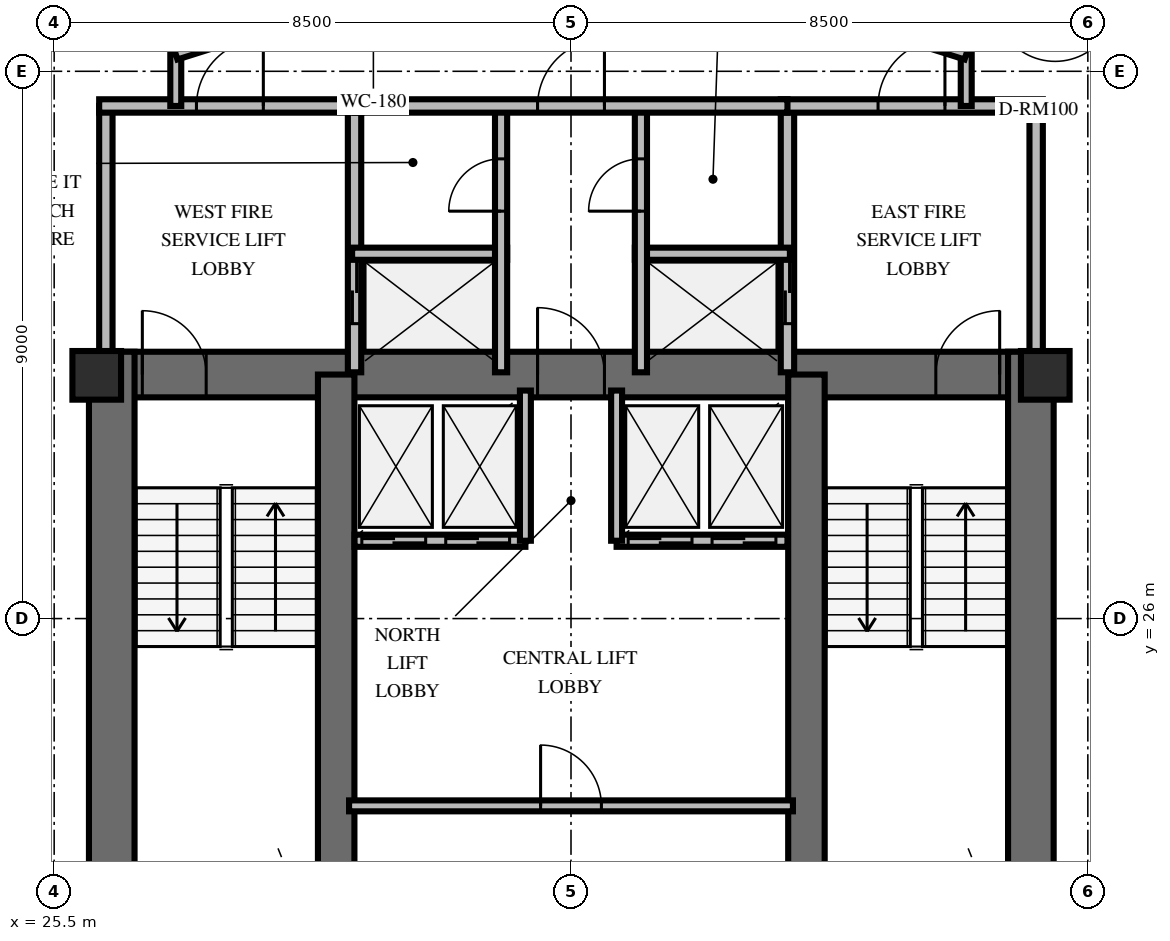
"""IFC4 building model, lengths in metres.
Left out: names, types, materials, properties, quantities, classifications, styles, units other than length and angle.
Written with IfcOpenShell. Run it as: python <this file> out.ifc"""

import sys

from ifc_helpers import new_model, si_unit, direction, frame, frame_2d, origin, origin_2d, place, context, subcontext, project, spatial, rectangle, extrude, element, fill, save


model = new_model("IFC4")
c1 = context("Model", 3, precision=1e-05, world=origin(), true_north=direction((0.0, 1.0)))
c2 = subcontext(c1, "Body", "Model", "MODEL_VIEW")
j1 = project(units=[si_unit("LENGTHUNIT", "METRE"), si_unit("PLANEANGLEUNIT", "RADIAN")], contexts=[c1])
p1 = place(None, origin())
s1 = spatial("IfcSite", under=j1, at=p1, CompositionType="ELEMENT")
p2 = place(p1, origin())
s2 = spatial("IfcBuilding", under=s1, at=p2, CompositionType="ELEMENT")
p3 = place(p2, frame((0.0, 0.0, 206.0)))
s3 = spatial("IfcBuildingStorey", under=s2, at=p3, CompositionType="ELEMENT", Elevation=206.0)
p4 = place(p3, frame((26.072, 30.013, 0.0), z_axis=(0.0, 0.0, 1.0), x_axis=(1.0, 0.0, 0.0)))
e1 = element("IfcWall", 1, at=p4, inside=s3, PredefinedType="SHEAR", context=c2, shape_type="SweptSolid", body=[
    extrude(rectangle(XDim=15.866, YDim=0.75, at=frame_2d((7.933, 0.0))), origin(), (0.0, 0.0, 1.0), 3.6),
])
p5 = place(p4, frame((0.878, 0.0, 0.0)))
e2 = element("IfcOpeningElement", 2, at=p5, cuts=e1, PredefinedType="OPENING", context=c2, shape_type="SweptSolid", body=[
    extrude(rectangle(XDim=1.05, YDim=2.15, at=frame_2d((0.525, 1.075))), frame((0.0, 0.385, 0.0), z_axis=(0.0, -1.0, 0.0), x_axis=(1.0, 0.0, 0.0)), (0.0, 0.0, 1.0), 0.77),
])
p6 = place(p4, frame((13.928, 0.0, 0.0)))
e3 = element("IfcOpeningElement", 3, at=p6, cuts=e1, PredefinedType="OPENING", context=c2, shape_type="SweptSolid", body=[
    extrude(rectangle(XDim=1.05, YDim=2.15, at=frame_2d((0.525, 1.075))), frame((0.0, 0.385, 0.0), z_axis=(0.0, -1.0, 0.0), x_axis=(1.0, 0.0, 0.0)), (0.0, 0.0, 1.0), 0.77),
])
p7 = place(p4, frame((7.378, 0.0, 0.0)))
e4 = element("IfcOpeningElement", 4, at=p7, cuts=e1, PredefinedType="OPENING", context=c2, shape_type="SweptSolid", body=[
    extrude(rectangle(XDim=1.1, YDim=2.15, at=frame_2d((0.55, 1.075))), frame((0.0, 0.385, 0.0), z_axis=(0.0, -1.0, 0.0), x_axis=(1.0, 0.0, 0.0)), (0.0, 0.0, 1.0), 0.77),
])
for number, where, z_axis, x_axis in (
    (5, (26.447, 19.812, 0.0), (0.0, 0.0, 1.0), (0.0, 1.0, 0.0)),
    (6, (41.563, 19.812, 0.0), (0.0, 0.0, 1.0), (0.0, 1.0, 0.0)),
):
    element("IfcWall", number, at=place(p3, frame(where, z_axis=z_axis, x_axis=x_axis)), inside=s3, PredefinedType="SHEAR", context=c2, shape_type="SweptSolid", body=[
        extrude(rectangle(XDim=10.576, YDim=0.75, at=frame_2d((5.288, 0.0))), origin(), (0.0, 0.0, 1.0), 3.6),
    ])
for number, where, z_axis, x_axis in (
    (7, (30.138, 20.187, 0.0), (0.0, 0.0, 1.0), (0.0, 1.0, 0.0)),
    (8, (37.872, 20.187, 0.0), (0.0, 0.0, 1.0), (0.0, 1.0, 0.0)),
):
    element("IfcWall", number, at=place(p3, frame(where, z_axis=z_axis, x_axis=x_axis)), inside=s3, PredefinedType="SHEAR", context=c2, shape_type="SweptSolid", body=[
        extrude(rectangle(XDim=9.826, YDim=0.6, at=frame_2d((4.913, 0.0))), origin(), (0.0, 0.0, 1.0), 3.6),
    ])
for number, where, z_axis, x_axis in (
    (9, (26.2, 30.0, 0.0), (0.0, 0.0, 1.0), (1.0, 0.0, 0.0)),
    (10, (41.8, 30.0, 0.0), (0.0, 0.0, 1.0), (1.0, 0.0, 0.0)),
):
    element("IfcColumn", number, at=place(p3, frame(where, z_axis=z_axis, x_axis=x_axis)), inside=s3, PredefinedType="PILASTER", context=c2, shape_type="SweptSolid", body=[
        extrude(rectangle(XDim=0.8, YDim=0.8, at=origin_2d()), origin(), (0.0, 0.0, 1.0), 3.6),
    ])
p8 = place(p3, frame((26.35, 30.05, 0.0), z_axis=(0.0, 0.0, 1.0), x_axis=(0.0, 1.0, 0.0)))
e11 = element("IfcWall", 11, at=p8, inside=s3, PredefinedType="SOLIDWALL", context=c2, shape_type="SweptSolid", body=[
    extrude(rectangle(XDim=4.38, YDim=0.22, at=frame_2d((2.19, 0.0))), origin(), (0.0, 0.0, 1.0), 2.46),
])
p9 = place(p3, frame((30.44, 30.05, 0.0), z_axis=(0.0, 0.0, 1.0), x_axis=(0.0, 1.0, 0.0)))
e12 = element("IfcWall", 12, at=p9, inside=s3, PredefinedType="SOLIDWALL", context=c2, shape_type="SweptSolid", body=[
    extrude(rectangle(XDim=4.38, YDim=0.22, at=frame_2d((2.19, 0.0))), origin(), (0.0, 0.0, 1.0), 2.46),
])
p10 = place(p9, frame((0.8, 0.0, 0.0)))
e13 = element("IfcOpeningElement", 13, at=p10, cuts=e12, PredefinedType="OPENING", context=c2, shape_type="SweptSolid", body=[
    extrude(rectangle(XDim=1.05, YDim=2.1, at=frame_2d((0.525, 1.05))), frame((0.0, 0.12, 0.0), z_axis=(0.0, -1.0, 0.0), x_axis=(1.0, 0.0, 0.0)), (0.0, 0.0, 1.0), 0.24),
])
p11 = place(p3, frame((26.24, 34.43, 0.0), z_axis=(0.0, 0.0, 1.0), x_axis=(1.0, 0.0, 0.0)))
e14 = element("IfcWall", 14, at=p11, inside=s3, PredefinedType="SOLIDWALL", context=c2, shape_type="SweptSolid", body=[
    extrude(rectangle(XDim=4.31, YDim=0.22, at=frame_2d((2.155, 0.0))), origin(), (0.0, 0.0, 1.0), 2.46),
])
p12 = place(p11, frame((1.6, 0.0, 0.0)))
e15 = element("IfcOpeningElement", 15, at=p12, cuts=e14, PredefinedType="OPENING", context=c2, shape_type="SweptSolid", body=[
    extrude(rectangle(XDim=1.1, YDim=2.15, at=frame_2d((0.55, 1.075))), frame((0.0, 0.12, 0.0), z_axis=(0.0, -1.0, 0.0), x_axis=(1.0, 0.0, 0.0)), (0.0, 0.0, 1.0), 0.24),
])
p13 = place(p3, frame((30.4, 32.0, 0.0), z_axis=(0.0, 0.0, 1.0), x_axis=(1.0, 0.0, 0.0)))
e16 = element("IfcWall", 16, at=p13, inside=s3, PredefinedType="SOLIDWALL", context=c2, shape_type="SweptSolid", body=[
    extrude(rectangle(XDim=2.55, YDim=0.2, at=frame_2d((1.275, 0.0))), origin(), (0.0, 0.0, 1.0), 2.46),
])
p14 = place(p3, frame((32.85, 30.05, 0.0), z_axis=(0.0, 0.0, 1.0), x_axis=(0.0, 1.0, 0.0)))
e17 = element("IfcWall", 17, at=p14, inside=s3, PredefinedType="SOLIDWALL", context=c2, shape_type="SweptSolid", body=[
    extrude(rectangle(XDim=4.38, YDim=0.2, at=frame_2d((2.19, 0.0))), origin(), (0.0, 0.0, 1.0), 2.46),
])
p15 = place(p14, frame((2.65, 0.0, 0.0)))
e18 = element("IfcOpeningElement", 18, at=p15, cuts=e17, PredefinedType="OPENING", context=c2, shape_type="SweptSolid", body=[
    extrude(rectangle(XDim=0.86, YDim=2.05, at=frame_2d((0.43, 1.025))), frame((0.0, 0.11, 0.0), z_axis=(0.0, -1.0, 0.0), x_axis=(1.0, 0.0, 0.0)), (0.0, 0.0, 1.0), 0.22),
])
p16 = place(p3, frame((37.56, 30.05, 0.0), z_axis=(0.0, 0.0, 1.0), x_axis=(0.0, 1.0, 0.0)))
e19 = element("IfcWall", 19, at=p16, inside=s3, PredefinedType="SOLIDWALL", context=c2, shape_type="SweptSolid", body=[
    extrude(rectangle(XDim=4.38, YDim=0.22, at=frame_2d((2.19, 0.0))), origin(), (0.0, 0.0, 1.0), 2.46),
])
p17 = place(p16, frame((0.8, 0.0, 0.0)))
e20 = element("IfcOpeningElement", 20, at=p17, cuts=e19, PredefinedType="OPENING", context=c2, shape_type="SweptSolid", body=[
    extrude(rectangle(XDim=1.05, YDim=2.1, at=frame_2d((0.525, 1.05))), frame((0.0, 0.12, 0.0), z_axis=(0.0, -1.0, 0.0), x_axis=(1.0, 0.0, 0.0)), (0.0, 0.0, 1.0), 0.24),
])
p18 = place(p3, frame((41.65, 30.05, 0.0), z_axis=(0.0, 0.0, 1.0), x_axis=(0.0, 1.0, 0.0)))
e21 = element("IfcWall", 21, at=p18, inside=s3, PredefinedType="SOLIDWALL", context=c2, shape_type="SweptSolid", body=[
    extrude(rectangle(XDim=4.38, YDim=0.22, at=frame_2d((2.19, 0.0))), origin(), (0.0, 0.0, 1.0), 2.46),
])
p19 = place(p3, frame((37.45, 34.43, 0.0), z_axis=(0.0, 0.0, 1.0), x_axis=(1.0, 0.0, 0.0)))
e22 = element("IfcWall", 22, at=p19, inside=s3, PredefinedType="SOLIDWALL", context=c2, shape_type="SweptSolid", body=[
    extrude(rectangle(XDim=4.31, YDim=0.22, at=frame_2d((2.155, 0.0))), origin(), (0.0, 0.0, 1.0), 2.46),
])
p20 = place(p19, frame((1.6, 0.0, 0.0)))
e23 = element("IfcOpeningElement", 23, at=p20, cuts=e22, PredefinedType="OPENING", context=c2, shape_type="SweptSolid", body=[
    extrude(rectangle(XDim=1.1, YDim=2.15, at=frame_2d((0.55, 1.075))), frame((0.0, 0.12, 0.0), z_axis=(0.0, -1.0, 0.0), x_axis=(1.0, 0.0, 0.0)), (0.0, 0.0, 1.0), 0.24),
])
p21 = place(p3, frame((35.05, 32.0, 0.0), z_axis=(0.0, 0.0, 1.0), x_axis=(1.0, 0.0, 0.0)))
e24 = element("IfcWall", 24, at=p21, inside=s3, PredefinedType="SOLIDWALL", context=c2, shape_type="SweptSolid", body=[
    extrude(rectangle(XDim=2.55, YDim=0.2, at=frame_2d((1.275, 0.0))), origin(), (0.0, 0.0, 1.0), 2.46),
])
p22 = place(p3, frame((35.15, 30.05, 0.0), z_axis=(0.0, 0.0, 1.0), x_axis=(0.0, 1.0, 0.0)))
e25 = element("IfcWall", 25, at=p22, inside=s3, PredefinedType="SOLIDWALL", context=c2, shape_type="SweptSolid", body=[
    extrude(rectangle(XDim=4.38, YDim=0.2, at=frame_2d((2.19, 0.0))), origin(), (0.0, 0.0, 1.0), 2.46),
])
p23 = place(p22, frame((2.65, 0.0, 0.0)))
e26 = element("IfcOpeningElement", 26, at=p23, cuts=e25, PredefinedType="OPENING", context=c2, shape_type="SweptSolid", body=[
    extrude(rectangle(XDim=0.86, YDim=2.05, at=frame_2d((0.43, 1.025))), frame((0.0, 0.11, 0.0), z_axis=(0.0, -1.0, 0.0), x_axis=(1.0, 0.0, 0.0)), (0.0, 0.0, 1.0), 0.22),
])
p24 = place(p3, frame((30.44, 34.43, 0.0), z_axis=(0.0, 0.0, 1.0), x_axis=(1.0, 0.0, 0.0)))
e27 = element("IfcWall", 27, at=p24, inside=s3, PredefinedType="SOLIDWALL", context=c2, shape_type="SweptSolid", body=[
    extrude(rectangle(XDim=7.12, YDim=0.22, at=frame_2d((3.56, 0.0))), origin(), (0.0, 0.0, 1.0), 2.46),
])
p25 = place(p24, frame((3.01, 0.0, 0.0)))
e28 = element("IfcOpeningElement", 28, at=p25, cuts=e27, PredefinedType="OPENING", context=c2, shape_type="SweptSolid", body=[
    extrude(rectangle(XDim=1.1, YDim=2.15, at=frame_2d((0.55, 1.075))), frame((0.0, 0.12, 0.0), z_axis=(0.0, -1.0, 0.0), x_axis=(1.0, 0.0, 0.0)), (0.0, 0.0, 1.0), 0.24),
])
p26 = place(p3, frame((30.35, 22.92, 0.0), z_axis=(0.0, 0.0, 1.0), x_axis=(1.0, 0.0, 0.0)))
e29 = element("IfcWall", 29, at=p26, inside=s3, PredefinedType="PARTITIONING", context=c2, shape_type="SweptSolid", body=[
    extrude(rectangle(XDim=7.3, YDim=0.18, at=frame_2d((3.65, 0.0))), origin(), (0.0, 0.0, 1.0), 2.46),
])
p27 = place(p26, frame((3.15, 0.0, 0.0)))
e30 = element("IfcOpeningElement", 30, at=p27, cuts=e29, PredefinedType="OPENING", context=c2, shape_type="SweptSolid", body=[
    extrude(rectangle(XDim=1.0, YDim=2.15, at=frame_2d((0.5, 1.075))), frame((0.0, 0.1, 0.0), z_axis=(0.0, -1.0, 0.0), x_axis=(1.0, 0.0, 0.0)), (0.0, 0.0, 1.0), 0.2),
])
p28 = place(p3, frame((30.44, 27.28, 0.0), z_axis=(0.0, 0.0, 1.0), x_axis=(1.0, 0.0, 0.0)))
e31 = element("IfcWall", 31, at=p28, inside=s3, PredefinedType="SOLIDWALL", context=c2, shape_type="SweptSolid", body=[
    extrude(rectangle(XDim=2.81, YDim=0.2, at=frame_2d((1.405, 0.0))), origin(), (0.0, 0.0, 1.0), 2.46),
])
p29 = place(p28, frame((0.12, 0.0, 0.0)))
e32 = element("IfcOpeningElement", 32, at=p29, cuts=e31, PredefinedType="OPENING", context=c2, shape_type="SweptSolid", body=[
    extrude(rectangle(XDim=1.05, YDim=2.1, at=frame_2d((0.525, 1.05))), frame((0.0, 0.11, 0.0), z_axis=(0.0, -1.0, 0.0), x_axis=(1.0, 0.0, 0.0)), (0.0, 0.0, 1.0), 0.22),
])
p30 = place(p28, frame((1.5, 0.0, 0.0)))
e33 = element("IfcOpeningElement", 33, at=p30, cuts=e31, PredefinedType="OPENING", context=c2, shape_type="SweptSolid", body=[
    extrude(rectangle(XDim=1.05, YDim=2.1, at=frame_2d((0.525, 1.05))), frame((0.0, 0.11, 0.0), z_axis=(0.0, -1.0, 0.0), x_axis=(1.0, 0.0, 0.0)), (0.0, 0.0, 1.0), 0.22),
])
p31 = place(p3, frame((33.25, 27.28, 0.0), z_axis=(0.0, 0.0, 1.0), x_axis=(0.0, 1.0, 0.0)))
e34 = element("IfcWall", 34, at=p31, inside=s3, PredefinedType="SOLIDWALL", context=c2, shape_type="SweptSolid", body=[
    extrude(rectangle(XDim=2.47, YDim=0.18, at=frame_2d((1.235, 0.0))), origin(), (0.0, 0.0, 1.0), 2.46),
])
p32 = place(p3, frame((34.75, 27.28, 0.0), z_axis=(0.0, 0.0, 1.0), x_axis=(1.0, 0.0, 0.0)))
e35 = element("IfcWall", 35, at=p32, inside=s3, PredefinedType="SOLIDWALL", context=c2, shape_type="SweptSolid", body=[
    extrude(rectangle(XDim=2.81, YDim=0.2, at=frame_2d((1.405, 0.0))), origin(), (0.0, 0.0, 1.0), 2.46),
])
p33 = place(p32, frame((0.19, 0.0, 0.0)))
e36 = element("IfcOpeningElement", 36, at=p33, cuts=e35, PredefinedType="OPENING", context=c2, shape_type="SweptSolid", body=[
    extrude(rectangle(XDim=1.05, YDim=2.1, at=frame_2d((0.525, 1.05))), frame((0.0, 0.11, 0.0), z_axis=(0.0, -1.0, 0.0), x_axis=(1.0, 0.0, 0.0)), (0.0, 0.0, 1.0), 0.22),
])
p34 = place(p32, frame((1.57, 0.0, 0.0)))
e37 = element("IfcOpeningElement", 37, at=p34, cuts=e35, PredefinedType="OPENING", context=c2, shape_type="SweptSolid", body=[
    extrude(rectangle(XDim=1.05, YDim=2.1, at=frame_2d((0.525, 1.05))), frame((0.0, 0.11, 0.0), z_axis=(0.0, -1.0, 0.0), x_axis=(1.0, 0.0, 0.0)), (0.0, 0.0, 1.0), 0.22),
])
p35 = place(p3, frame((34.75, 27.28, 0.0), z_axis=(0.0, 0.0, 1.0), x_axis=(0.0, 1.0, 0.0)))
e38 = element("IfcWall", 38, at=p35, inside=s3, PredefinedType="SOLIDWALL", context=c2, shape_type="SweptSolid", body=[
    extrude(rectangle(XDim=2.47, YDim=0.18, at=frame_2d((1.235, 0.0))), origin(), (0.0, 0.0, 1.0), 2.46),
])
for number, where, z_axis, x_axis in (
    (39, (27.5, 34.43, 0.0), (0.0, 0.0, 1.0), (0.0, 1.0, 0.0)),
    (40, (40.5, 35.28, 0.0), (0.0, 0.0, 1.0), (0.0, -1.0, 0.0)),
):
    element("IfcWall", number, at=place(p3, frame(where, z_axis=z_axis, x_axis=x_axis)), inside=s3, PredefinedType="PARTITIONING", context=c2, shape_type="SweptSolid", body=[
        extrude(rectangle(XDim=0.85, YDim=0.18, at=frame_2d((0.425, 0.0))), origin(), (0.0, 0.0, 1.0), 2.46),
    ])
p36 = place(p3, frame((27.5, 35.28, 0.0), z_axis=(0.0, 0.0, 1.0), x_axis=(0.953691418528, 0.300786765376, 0.0)))
e41 = element("IfcWall", 41, at=p36, inside=s3, PredefinedType="PARTITIONING", context=c2, shape_type="SweptSolid", body=[
    extrude(rectangle(XDim=6.816, YDim=0.18, at=frame_2d((3.408, 0.0))), origin(), (0.0, 0.0, 1.0), 2.46),
])
p37 = place(p36, frame((2.858, 0.0, 0.0)))
e42 = element("IfcOpeningElement", 42, at=p37, cuts=e41, PredefinedType="OPENING", context=c2, shape_type="SweptSolid", body=[
    extrude(rectangle(XDim=1.1, YDim=2.15, at=frame_2d((0.55, 1.075))), frame((0.0, 0.1, 0.0), z_axis=(0.0, -1.0, 0.0), x_axis=(1.0, 0.0, 0.0)), (0.0, 0.0, 1.0), 0.2),
])
p38 = place(p3, frame((34.0, 37.33, 0.0), z_axis=(0.0, 0.0, 1.0), x_axis=(0.953691418528, -0.300786765376, 0.0)))
e43 = element("IfcWall", 43, at=p38, inside=s3, PredefinedType="PARTITIONING", context=c2, shape_type="SweptSolid", body=[
    extrude(rectangle(XDim=6.816, YDim=0.18, at=frame_2d((3.408, 0.0))), origin(), (0.0, 0.0, 1.0), 2.46),
])
p39 = place(p38, frame((2.858, 0.0, 0.0)))
e44 = element("IfcOpeningElement", 44, at=p39, cuts=e43, PredefinedType="OPENING", context=c2, shape_type="SweptSolid", body=[
    extrude(rectangle(XDim=1.1, YDim=2.15, at=frame_2d((0.55, 1.075))), frame((0.0, 0.1, 0.0), z_axis=(0.0, -1.0, 0.0), x_axis=(1.0, 0.0, 0.0)), (0.0, 0.0, 1.0), 0.2),
])
p40 = place(p3, frame((43.433, 35.046, 0.0), z_axis=(0.0, 0.0, 1.0), x_axis=(-0.796540561183, 0.604585092762, 0.0)))
e45 = element("IfcWall", 45, at=p40, inside=s3, PredefinedType="PARTITIONING", context=c2, shape_type="SweptSolid", body=[
    extrude(rectangle(XDim=4.089, YDim=0.18, at=frame_2d((2.044, 0.0))), origin(), (0.0, 0.0, 1.0), 2.46),
])
p41 = place(p40, frame((0.847, 0.0, 0.0)))
e46 = element("IfcOpeningElement", 46, at=p41, cuts=e45, PredefinedType="OPENING", context=c2, shape_type="SweptSolid", body=[
    extrude(rectangle(XDim=1.0, YDim=2.15, at=frame_2d((0.5, 1.075))), frame((0.0, 0.1, 0.0), z_axis=(0.0, -1.0, 0.0), x_axis=(1.0, 0.0, 0.0)), (0.0, 0.0, 1.0), 0.2),
])
p42 = place(p3, frame((27.113, 37.108, 0.0), z_axis=(0.0, 0.0, 1.0), x_axis=(-0.745456496411, -0.66655428283, 0.0)))
e47 = element("IfcWall", 47, at=p42, inside=s3, PredefinedType="PARTITIONING", context=c2, shape_type="SweptSolid", body=[
    extrude(rectangle(XDim=4.539, YDim=0.18, at=frame_2d((2.27, 0.0))), origin(), (0.0, 0.0, 1.0), 2.46),
])
p43 = place(p42, frame((2.579, 0.0, 0.0)))
e48 = element("IfcOpeningElement", 48, at=p43, cuts=e47, PredefinedType="OPENING", context=c2, shape_type="SweptSolid", body=[
    extrude(rectangle(XDim=1.0, YDim=2.15, at=frame_2d((0.5, 1.075))), frame((0.0, 0.1, 0.0), z_axis=(0.0, -1.0, 0.0), x_axis=(1.0, 0.0, 0.0)), (0.0, 0.0, 1.0), 0.2),
])
p44 = place(p5, origin())
e49 = element("IfcDoor", 49, at=p44, inside=s3, OperationType="SINGLE_SWING_LEFT", PredefinedType="DOOR", context=c2, shape_type="SweptSolid", body=[
    extrude(rectangle(XDim=1.05, YDim=2.15, at=frame_2d((0.525, 1.075))), frame((0.0, 0.025, 0.0), z_axis=(0.0, -1.0, 0.0), x_axis=(1.0, 0.0, 0.0)), (0.0, 0.0, 1.0), 0.05),
])
fill(e2, e49)
p45 = place(p6, origin())
e50 = element("IfcDoor", 50, at=p45, inside=s3, OperationType="SINGLE_SWING_RIGHT", PredefinedType="DOOR", context=c2, shape_type="SweptSolid", body=[
    extrude(rectangle(XDim=1.05, YDim=2.15, at=frame_2d((0.525, 1.075))), frame((0.0, 0.025, 0.0), z_axis=(0.0, -1.0, 0.0), x_axis=(1.0, 0.0, 0.0)), (0.0, 0.0, 1.0), 0.05),
])
fill(e3, e50)
p46 = place(p7, origin())
e51 = element("IfcDoor", 51, at=p46, inside=s3, OperationType="SINGLE_SWING_LEFT", PredefinedType="DOOR", context=c2, shape_type="SweptSolid", body=[
    extrude(rectangle(XDim=1.1, YDim=2.15, at=frame_2d((0.55, 1.075))), frame((0.0, 0.025, 0.0), z_axis=(0.0, -1.0, 0.0), x_axis=(1.0, 0.0, 0.0)), (0.0, 0.0, 1.0), 0.05),
])
fill(e4, e51)
p47 = place(p12, origin())
e52 = element("IfcDoor", 52, at=p47, inside=s3, OperationType="SINGLE_SWING_RIGHT", PredefinedType="DOOR", context=c2, shape_type="SweptSolid", body=[
    extrude(rectangle(XDim=1.1, YDim=2.15, at=frame_2d((0.55, 1.075))), frame((0.0, 0.025, 0.0), z_axis=(0.0, -1.0, 0.0), x_axis=(1.0, 0.0, 0.0)), (0.0, 0.0, 1.0), 0.05),
])
fill(e15, e52)
p48 = place(p10, origin())
e53 = element("IfcDoor", 53, at=p48, inside=s3, OperationType="DOUBLE_DOOR_SLIDING", PredefinedType="USERDEFINED", context=c2, shape_type="SweptSolid", body=[
    extrude(rectangle(XDim=1.05, YDim=2.1, at=frame_2d((0.525, 1.05))), frame((0.0, 0.025, 0.0), z_axis=(0.0, -1.0, 0.0), x_axis=(1.0, 0.0, 0.0)), (0.0, 0.0, 1.0), 0.05),
])
fill(e13, e53)
p49 = place(p15, origin())
e54 = element("IfcDoor", 54, at=p49, inside=s3, OperationType="SINGLE_SWING_LEFT", PredefinedType="TRAPDOOR", context=c2, shape_type="SweptSolid", body=[
    extrude(rectangle(XDim=0.86, YDim=2.05, at=frame_2d((0.43, 1.025))), frame((0.0, 0.025, 0.0), z_axis=(0.0, -1.0, 0.0), x_axis=(1.0, 0.0, 0.0)), (0.0, 0.0, 1.0), 0.05),
])
fill(e18, e54)
p50 = place(p20, origin())
e55 = element("IfcDoor", 55, at=p50, inside=s3, OperationType="SINGLE_SWING_RIGHT", PredefinedType="DOOR", context=c2, shape_type="SweptSolid", body=[
    extrude(rectangle(XDim=1.1, YDim=2.15, at=frame_2d((0.55, 1.075))), frame((0.0, 0.025, 0.0), z_axis=(0.0, -1.0, 0.0), x_axis=(1.0, 0.0, 0.0)), (0.0, 0.0, 1.0), 0.05),
])
fill(e23, e55)
p51 = place(p17, origin())
e56 = element("IfcDoor", 56, at=p51, inside=s3, OperationType="DOUBLE_DOOR_SLIDING", PredefinedType="USERDEFINED", context=c2, shape_type="SweptSolid", body=[
    extrude(rectangle(XDim=1.05, YDim=2.1, at=frame_2d((0.525, 1.05))), frame((0.0, 0.025, 0.0), z_axis=(0.0, -1.0, 0.0), x_axis=(1.0, 0.0, 0.0)), (0.0, 0.0, 1.0), 0.05),
])
fill(e20, e56)
p52 = place(p23, origin())
e57 = element("IfcDoor", 57, at=p52, inside=s3, OperationType="SINGLE_SWING_LEFT", PredefinedType="TRAPDOOR", context=c2, shape_type="SweptSolid", body=[
    extrude(rectangle(XDim=0.86, YDim=2.05, at=frame_2d((0.43, 1.025))), frame((0.0, 0.025, 0.0), z_axis=(0.0, -1.0, 0.0), x_axis=(1.0, 0.0, 0.0)), (0.0, 0.0, 1.0), 0.05),
])
fill(e26, e57)
p53 = place(p25, origin())
e58 = element("IfcDoor", 58, at=p53, inside=s3, OperationType="SINGLE_SWING_RIGHT", PredefinedType="DOOR", context=c2, shape_type="SweptSolid", body=[
    extrude(rectangle(XDim=1.1, YDim=2.15, at=frame_2d((0.55, 1.075))), frame((0.0, 0.025, 0.0), z_axis=(0.0, -1.0, 0.0), x_axis=(1.0, 0.0, 0.0)), (0.0, 0.0, 1.0), 0.05),
])
fill(e28, e58)
p54 = place(p27, origin())
e59 = element("IfcDoor", 59, at=p54, inside=s3, OperationType="SINGLE_SWING_LEFT", PredefinedType="DOOR", context=c2, shape_type="SweptSolid", body=[
    extrude(rectangle(XDim=1.0, YDim=2.15, at=frame_2d((0.5, 1.075))), frame((0.0, 0.025, 0.0), z_axis=(0.0, -1.0, 0.0), x_axis=(1.0, 0.0, 0.0)), (0.0, 0.0, 1.0), 0.05),
])
fill(e30, e59)
p55 = place(p29, origin())
e60 = element("IfcDoor", 60, at=p55, inside=s3, OperationType="DOUBLE_DOOR_SLIDING", PredefinedType="USERDEFINED", context=c2, shape_type="SweptSolid", body=[
    extrude(rectangle(XDim=1.05, YDim=2.1, at=frame_2d((0.525, 1.05))), frame((0.0, 0.025, 0.0), z_axis=(0.0, -1.0, 0.0), x_axis=(1.0, 0.0, 0.0)), (0.0, 0.0, 1.0), 0.05),
])
fill(e32, e60)
p56 = place(p30, origin())
e61 = element("IfcDoor", 61, at=p56, inside=s3, OperationType="DOUBLE_DOOR_SLIDING", PredefinedType="USERDEFINED", context=c2, shape_type="SweptSolid", body=[
    extrude(rectangle(XDim=1.05, YDim=2.1, at=frame_2d((0.525, 1.05))), frame((0.0, 0.025, 0.0), z_axis=(0.0, -1.0, 0.0), x_axis=(1.0, 0.0, 0.0)), (0.0, 0.0, 1.0), 0.05),
])
fill(e33, e61)
p57 = place(p33, origin())
e62 = element("IfcDoor", 62, at=p57, inside=s3, OperationType="DOUBLE_DOOR_SLIDING", PredefinedType="USERDEFINED", context=c2, shape_type="SweptSolid", body=[
    extrude(rectangle(XDim=1.05, YDim=2.1, at=frame_2d((0.525, 1.05))), frame((0.0, 0.025, 0.0), z_axis=(0.0, -1.0, 0.0), x_axis=(1.0, 0.0, 0.0)), (0.0, 0.0, 1.0), 0.05),
])
fill(e36, e62)
p58 = place(p34, origin())
e63 = element("IfcDoor", 63, at=p58, inside=s3, OperationType="DOUBLE_DOOR_SLIDING", PredefinedType="USERDEFINED", context=c2, shape_type="SweptSolid", body=[
    extrude(rectangle(XDim=1.05, YDim=2.1, at=frame_2d((0.525, 1.05))), frame((0.0, 0.025, 0.0), z_axis=(0.0, -1.0, 0.0), x_axis=(1.0, 0.0, 0.0)), (0.0, 0.0, 1.0), 0.05),
])
fill(e37, e63)
save(model, sys.argv[1])
